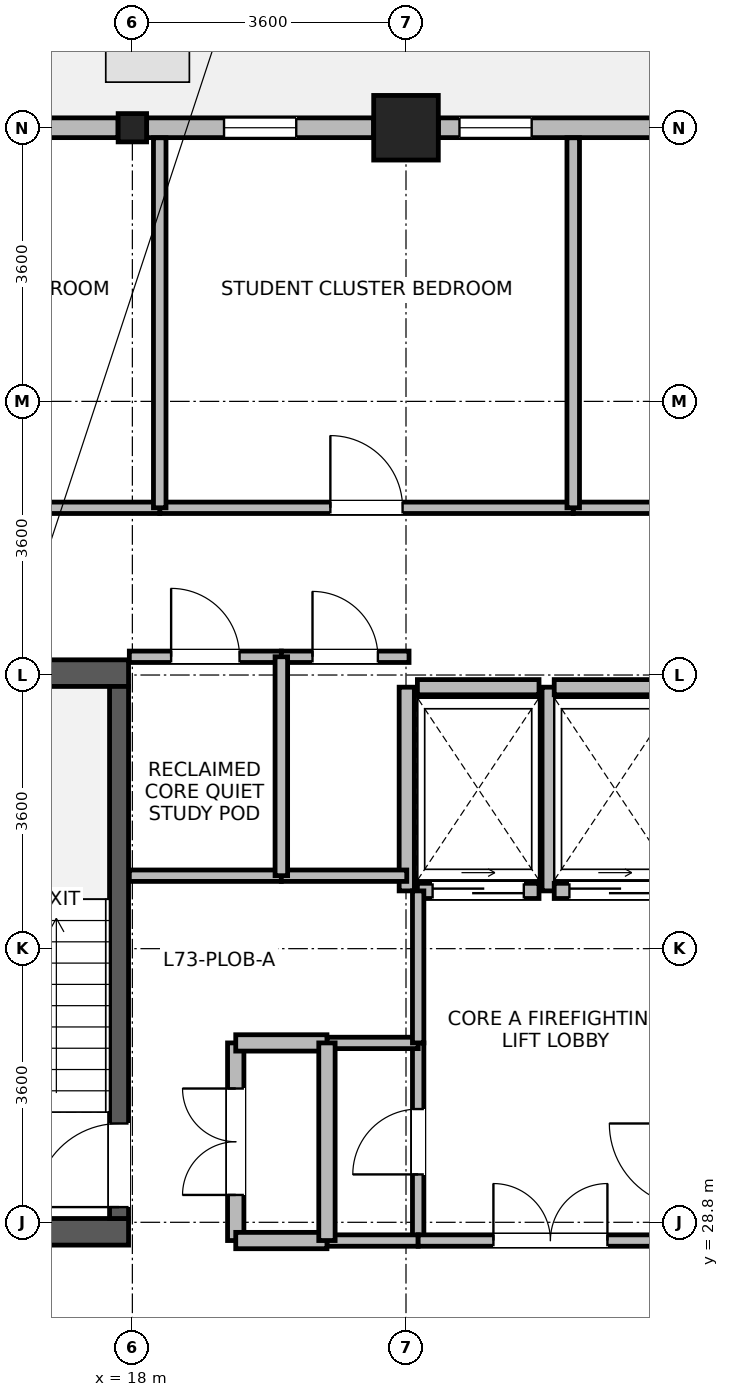
"""IFC4 building model, lengths in metres.
Left out: names, types, materials, properties, quantities, classifications, styles, units other than length and angle.
Written with IfcOpenShell. Run it as: python <this file> out.ifc"""

import sys

from ifc_helpers import new_model, si_unit, direction, frame, frame_2d, origin, origin_2d, place, context, subcontext, project, spatial, rectangle, i_section, extrude, source, transform, mapped, element, fill, save


model = new_model("IFC4")
c1 = context("Model", 3, precision=1e-05, world=origin(), true_north=direction((0.0, 1.0)))
c2 = subcontext(c1, "Body", "Model", "MODEL_VIEW")
j1 = project(units=[si_unit("LENGTHUNIT", "METRE"), si_unit("PLANEANGLEUNIT", "RADIAN")], contexts=[c1])
p1 = place(None, origin())
s1 = spatial("IfcSite", under=j1, at=p1, CompositionType="ELEMENT")
p2 = place(p1, origin())
s2 = spatial("IfcBuilding", under=s1, at=p2, CompositionType="ELEMENT")
p3 = place(p2, frame((0.0, 0.0, 283.2)))
s3 = spatial("IfcBuildingStorey", under=s2, at=p3, CompositionType="ELEMENT", Elevation=283.2)
for number, where, z_axis, x_axis in (
    (1, (14.75, 28.675, 0.0), (0.0, 0.0, 1.0), (1.0, 0.0, 0.0)),
    (2, (14.75, 36.025, 0.0), (0.0, 0.0, 1.0), (1.0, 0.0, 0.0)),
):
    element("IfcWall", number, at=place(p3, frame(where, z_axis=z_axis, x_axis=x_axis)), inside=s3, PredefinedType="SHEAR", context=c2, shape_type="SweptSolid", body=[
        extrude(rectangle(XDim=3.2, YDim=0.35, at=frame_2d((1.6, 0.0))), origin(), (0.0, 0.0, 1.0), 3.475),
    ])
p4 = place(p3, frame((17.825, 28.85, 0.0), z_axis=(0.0, 0.0, 1.0), x_axis=(0.0, 1.0, 0.0)))
e3 = element("IfcWall", 3, at=p4, inside=s3, PredefinedType="SHEAR", context=c2, shape_type="SweptSolid", body=[
    extrude(rectangle(XDim=7.0, YDim=0.25, at=frame_2d((3.5, 0.0))), origin(), (0.0, 0.0, 1.0), 3.475),
])
p5 = place(p4, frame((0.15, 0.0, 0.0)))
e4 = element("IfcOpeningElement", 4, at=p5, cuts=e3, PredefinedType="OPENING", context=c2, shape_type="SweptSolid", body=[
    extrude(rectangle(XDim=1.1, YDim=2.08, at=frame_2d((0.55, 1.04))), frame((0.0, 0.135, 0.0), z_axis=(0.0, -1.0, 0.0), x_axis=(1.0, 0.0, 0.0)), (0.0, 0.0, 1.0), 0.27),
])
m1 = source(origin(), c2, "Body", "SweptSolid", [
    extrude(rectangle(XDim=0.85, YDim=0.85, at=origin_2d()), origin(), (0.0, 0.0, 1.0), 3.7),
])
p6 = place(p3, frame((21.6, 43.2, 0.0), z_axis=(0.0, 0.0, 1.0), x_axis=(1.0, 0.0, 0.0)))
e5 = element("IfcColumn", 5, at=p6, inside=s3, PredefinedType="COLUMN", context=c2, shape_type="MappedRepresentation", body=[
    mapped(m1, transform((0.0, 0.0, 0.0), x_axis=(1.0, 0.0, 0.0), y_axis=(0.0, 1.0, 0.0), z_axis=(0.0, 0.0, 1.0), scale=1.0)),
])
m2 = source(origin(), c2, "Body", "SweptSolid", [
    extrude(i_section(OverallWidth=0.374, OverallDepth=0.372, WebThickness=0.015, FlangeThickness=0.026, FilletRadius=0.015, at=origin_2d()), origin(), (0.0, 0.0, 1.0), 3.7),
])
p7 = place(p3, frame((18.0, 43.2, 0.0), z_axis=(0.0, 0.0, 1.0), x_axis=(1.0, 0.0, 0.0)))
e6 = element("IfcColumn", 6, at=p7, inside=s3, PredefinedType="COLUMN", context=c2, shape_type="MappedRepresentation", body=[
    mapped(m2, transform((0.0, 0.0, 0.0), x_axis=(1.0, 0.0, 0.0), y_axis=(0.0, 1.0, 0.0), z_axis=(0.0, 0.0, 1.0), scale=1.0)),
])
p8 = place(p3, frame((22.026, 43.2, 0.0), z_axis=(0.0, 0.0, 1.0), x_axis=(1.0, 0.0, 0.0)))
e7 = element("IfcWall", 7, at=p8, inside=s3, PredefinedType="STANDARD", context=c2, shape_type="SweptSolid", body=[
    extrude(rectangle(XDim=2.986, YDim=0.26, at=frame_2d((1.493, 0.0))), origin(), (0.0, 0.0, 1.0), 3.055),
])
p9 = place(p8, frame((0.278, 0.0, 0.85)))
e8 = element("IfcOpeningElement", 8, at=p9, cuts=e7, PredefinedType="OPENING", context=c2, shape_type="SweptSolid", body=[
    extrude(rectangle(XDim=0.95, YDim=1.75, at=frame_2d((0.475, 0.875))), frame((0.0, 0.14, 0.0), z_axis=(0.0, -1.0, 0.0), x_axis=(1.0, 0.0, 0.0)), (0.0, 0.0, 1.0), 0.28),
])
p10 = place(p3, frame((18.188, 43.2, 0.0), z_axis=(0.0, 0.0, 1.0), x_axis=(1.0, 0.0, 0.0)))
e9 = element("IfcWall", 9, at=p10, inside=s3, PredefinedType="STANDARD", context=c2, shape_type="SweptSolid", body=[
    extrude(rectangle(XDim=2.986, YDim=0.26, at=frame_2d((1.493, 0.0))), origin(), (0.0, 0.0, 1.0), 3.055),
])
p11 = place(p10, frame((1.018, 0.0, 0.85)))
e10 = element("IfcOpeningElement", 10, at=p11, cuts=e9, PredefinedType="OPENING", context=c2, shape_type="SweptSolid", body=[
    extrude(rectangle(XDim=0.95, YDim=1.75, at=frame_2d((0.475, 0.875))), frame((0.0, 0.14, 0.0), z_axis=(0.0, -1.0, 0.0), x_axis=(1.0, 0.0, 0.0)), (0.0, 0.0, 1.0), 0.28),
])
p12 = place(p3, frame((14.826, 43.2, 0.0), z_axis=(0.0, 0.0, 1.0), x_axis=(1.0, 0.0, 0.0)))
e11 = element("IfcWall", 11, at=p12, inside=s3, PredefinedType="STANDARD", context=c2, shape_type="SweptSolid", body=[
    extrude(rectangle(XDim=2.986, YDim=0.26, at=frame_2d((1.493, 0.0))), origin(), (0.0, 0.0, 1.0), 3.055),
])
p13 = place(p12, frame((1.018, 0.0, 0.85)))
e12 = element("IfcOpeningElement", 12, at=p13, cuts=e11, PredefinedType="OPENING", context=c2, shape_type="SweptSolid", body=[
    extrude(rectangle(XDim=0.95, YDim=1.75, at=frame_2d((0.475, 0.875))), frame((0.0, 0.14, 0.0), z_axis=(0.0, -1.0, 0.0), x_axis=(1.0, 0.0, 0.0)), (0.0, 0.0, 1.0), 0.28),
])
p14 = place(p3, frame((21.75, 33.16, 0.0), z_axis=(0.0, 0.0, 1.0), x_axis=(1.0, 0.0, 0.0)))
e13 = element("IfcWall", 13, at=p14, inside=s3, PredefinedType="PARTITIONING", context=c2, shape_type="SweptSolid", body=[
    extrude(rectangle(XDim=1.6, YDim=0.2, at=frame_2d((0.8, 0.0))), origin(), (0.0, 0.0, 1.0), 3.455),
])
p15 = place(p14, frame((0.2, 0.0, 0.0)))
e14 = element("IfcOpeningElement", 14, at=p15, cuts=e13, PredefinedType="OPENING", context=c2, shape_type="SweptSolid", body=[
    extrude(rectangle(XDim=1.2, YDim=2.12, at=frame_2d((0.6, 1.06))), frame((0.0, 0.11, 0.0), z_axis=(0.0, -1.0, 0.0), x_axis=(1.0, 0.0, 0.0)), (0.0, 0.0, 1.0), 0.22),
])
p16 = place(p3, frame((21.75, 35.84, 0.0), z_axis=(0.0, 0.0, 1.0), x_axis=(1.0, 0.0, 0.0)))
e15 = element("IfcWall", 15, at=p16, inside=s3, PredefinedType="PARTITIONING", context=c2, shape_type="SweptSolid", body=[
    extrude(rectangle(XDim=1.6, YDim=0.2, at=frame_2d((0.8, 0.0))), origin(), (0.0, 0.0, 1.0), 2.555),
])
for number, where, z_axis, x_axis in (
    (16, (21.61, 33.16, 0.0), (0.0, 0.0, 1.0), (0.0, 1.0, 0.0)),
    (17, (23.49, 33.16, 0.0), (0.0, 0.0, 1.0), (0.0, 1.0, 0.0)),
):
    element("IfcWall", number, at=place(p3, frame(where, z_axis=z_axis, x_axis=x_axis)), inside=s3, PredefinedType="PARTITIONING", context=c2, shape_type="SweptSolid", body=[
        extrude(rectangle(XDim=2.68, YDim=0.2, at=frame_2d((1.34, 0.0))), origin(), (0.0, 0.0, 1.0), 3.455),
    ])
p17 = place(p3, frame((23.55, 33.16, 0.0), z_axis=(0.0, 0.0, 1.0), x_axis=(1.0, 0.0, 0.0)))
e18 = element("IfcWall", 18, at=p17, inside=s3, PredefinedType="PARTITIONING", context=c2, shape_type="SweptSolid", body=[
    extrude(rectangle(XDim=1.6, YDim=0.2, at=frame_2d((0.8, 0.0))), origin(), (0.0, 0.0, 1.0), 3.455),
])
p18 = place(p17, frame((0.2, 0.0, 0.0)))
e19 = element("IfcOpeningElement", 19, at=p18, cuts=e18, PredefinedType="OPENING", context=c2, shape_type="SweptSolid", body=[
    extrude(rectangle(XDim=1.2, YDim=2.12, at=frame_2d((0.6, 1.06))), frame((0.0, 0.11, 0.0), z_axis=(0.0, -1.0, 0.0), x_axis=(1.0, 0.0, 0.0)), (0.0, 0.0, 1.0), 0.22),
])
p19 = place(p3, frame((23.55, 35.84, 0.0), z_axis=(0.0, 0.0, 1.0), x_axis=(1.0, 0.0, 0.0)))
e20 = element("IfcWall", 20, at=p19, inside=s3, PredefinedType="PARTITIONING", context=c2, shape_type="SweptSolid", body=[
    extrude(rectangle(XDim=1.6, YDim=0.2, at=frame_2d((0.8, 0.0))), origin(), (0.0, 0.0, 1.0), 2.555),
])
p20 = place(p3, frame((23.8, 38.2, 0.0), z_axis=(0.0, 0.0, 1.0), x_axis=(1.0, 0.0, 0.0)))
e21 = element("IfcWall", 21, at=p20, inside=s3, PredefinedType="PARTITIONING", context=c2, shape_type="SweptSolid", body=[
    extrude(rectangle(XDim=7.26, YDim=0.15, at=frame_2d((3.63, 0.0))), origin(), (0.0, 0.0, 1.0), 3.455),
])
p21 = place(p20, frame((2.98, 0.0, 0.0)))
e22 = element("IfcOpeningElement", 22, at=p21, cuts=e21, PredefinedType="OPENING", context=c2, shape_type="SweptSolid", body=[
    extrude(rectangle(XDim=1.3, YDim=2.12, at=frame_2d((0.65, 1.06))), frame((0.0, 0.085, 0.0), z_axis=(0.0, -1.0, 0.0), x_axis=(1.0, 0.0, 0.0)), (0.0, 0.0, 1.0), 0.17),
])
p22 = place(p3, frame((18.36, 38.2, 0.0), z_axis=(0.0, 0.0, 1.0), x_axis=(1.0, 0.0, 0.0)))
e23 = element("IfcWall", 23, at=p22, inside=s3, PredefinedType="PARTITIONING", context=c2, shape_type="SweptSolid", body=[
    extrude(rectangle(XDim=5.44, YDim=0.15, at=frame_2d((2.72, 0.0))), origin(), (0.0, 0.0, 1.0), 3.455),
])
p23 = place(p22, frame((2.245, 0.0, 0.0)))
e24 = element("IfcOpeningElement", 24, at=p23, cuts=e23, PredefinedType="OPENING", context=c2, shape_type="SweptSolid", body=[
    extrude(rectangle(XDim=0.95, YDim=2.1, at=frame_2d((0.475, 1.05))), frame((0.0, 0.085, 0.0), z_axis=(0.0, -1.0, 0.0), x_axis=(1.0, 0.0, 0.0)), (0.0, 0.0, 1.0), 0.17),
])
p24 = place(p3, frame((13.2, 38.2, 0.0), z_axis=(0.0, 0.0, 1.0), x_axis=(1.0, 0.0, 0.0)))
e25 = element("IfcWall", 25, at=p24, inside=s3, PredefinedType="PARTITIONING", context=c2, shape_type="SweptSolid", body=[
    extrude(rectangle(XDim=5.16, YDim=0.15, at=frame_2d((2.58, 0.0))), origin(), (0.0, 0.0, 1.0), 3.455),
])
p25 = place(p24, frame((2.105, 0.0, 0.0)))
e26 = element("IfcOpeningElement", 26, at=p25, cuts=e25, PredefinedType="OPENING", context=c2, shape_type="SweptSolid", body=[
    extrude(rectangle(XDim=0.95, YDim=2.1, at=frame_2d((0.475, 1.05))), frame((0.0, 0.085, 0.0), z_axis=(0.0, -1.0, 0.0), x_axis=(1.0, 0.0, 0.0)), (0.0, 0.0, 1.0), 0.17),
])
p26 = place(p3, frame((19.36, 28.56, 0.0), z_axis=(0.0, 0.0, 1.0), x_axis=(0.0, 1.0, 0.0)))
e27 = element("IfcWall", 27, at=p26, inside=s3, PredefinedType="PARTITIONING", context=c2, shape_type="SweptSolid", body=[
    extrude(rectangle(XDim=2.6, YDim=0.215, at=frame_2d((1.3, 0.0))), origin(), (0.0, 0.0, 1.0), 3.455),
])
p27 = place(p26, frame((0.6, 0.0, 0.0)))
e28 = element("IfcOpeningElement", 28, at=p27, cuts=e27, PredefinedType="OPENING", context=c2, shape_type="SweptSolid", body=[
    extrude(rectangle(XDim=1.4, YDim=2.15, at=frame_2d((0.7, 1.075))), frame((0.0, 0.118, 0.0), z_axis=(0.0, -1.0, 0.0), x_axis=(1.0, 0.0, 0.0)), (0.0, 0.0, 1.0), 0.235),
])
p28 = place(p3, frame((21.76, 28.56, 0.0), z_axis=(0.0, 0.0, 1.0), x_axis=(0.0, 1.0, 0.0)))
e29 = element("IfcWall", 29, at=p28, inside=s3, PredefinedType="PARTITIONING", context=c2, shape_type="SweptSolid", body=[
    extrude(rectangle(XDim=2.6, YDim=0.15, at=frame_2d((1.3, 0.0))), origin(), (0.0, 0.0, 1.0), 3.455),
])
p29 = place(p28, frame((0.87, 0.0, 0.0)))
e30 = element("IfcOpeningElement", 30, at=p29, cuts=e29, PredefinedType="OPENING", context=c2, shape_type="SweptSolid", body=[
    extrude(rectangle(XDim=0.86, YDim=2.02, at=frame_2d((0.43, 1.01))), frame((0.0, 0.085, 0.0), z_axis=(0.0, -1.0, 0.0), x_axis=(1.0, 0.0, 0.0)), (0.0, 0.0, 1.0), 0.17),
])
p30 = place(p3, frame((17.96, 33.36, 0.0), z_axis=(0.0, 0.0, 1.0), x_axis=(1.0, 0.0, 0.0)))
e31 = element("IfcWall", 31, at=p30, inside=s3, PredefinedType="PARTITIONING", context=c2, shape_type="SweptSolid", body=[
    extrude(rectangle(XDim=2.0, YDim=0.15, at=frame_2d((1.0, 0.0))), origin(), (0.0, 0.0, 1.0), 3.455),
])
p31 = place(p3, frame((17.96, 36.24, 0.0), z_axis=(0.0, 0.0, 1.0), x_axis=(1.0, 0.0, 0.0)))
e32 = element("IfcWall", 32, at=p31, inside=s3, PredefinedType="PARTITIONING", context=c2, shape_type="SweptSolid", body=[
    extrude(rectangle(XDim=2.0, YDim=0.15, at=frame_2d((1.0, 0.0))), origin(), (0.0, 0.0, 1.0), 2.555),
])
p32 = place(p31, frame((0.55, 0.0, 0.0)))
e33 = element("IfcOpeningElement", 33, at=p32, cuts=e32, PredefinedType="OPENING", context=c2, shape_type="SweptSolid", body=[
    extrude(rectangle(XDim=0.9, YDim=2.08, at=frame_2d((0.45, 1.04))), frame((0.0, 0.085, 0.0), z_axis=(0.0, -1.0, 0.0), x_axis=(1.0, 0.0, 0.0)), (0.0, 0.0, 1.0), 0.17),
])
p33 = place(p3, frame((19.96, 33.36, 0.0), z_axis=(0.0, 0.0, 1.0), x_axis=(1.0, 0.0, 0.0)))
e34 = element("IfcWall", 34, at=p33, inside=s3, PredefinedType="PARTITIONING", context=c2, shape_type="SweptSolid", body=[
    extrude(rectangle(XDim=1.65, YDim=0.15, at=frame_2d((0.825, 0.0))), origin(), (0.0, 0.0, 1.0), 3.455),
])
p34 = place(p3, frame((19.96, 36.24, 0.0), z_axis=(0.0, 0.0, 1.0), x_axis=(1.0, 0.0, 0.0)))
e35 = element("IfcWall", 35, at=p34, inside=s3, PredefinedType="PARTITIONING", context=c2, shape_type="SweptSolid", body=[
    extrude(rectangle(XDim=1.68, YDim=0.15, at=frame_2d((0.84, 0.0))), origin(), (0.0, 0.0, 1.0), 2.555),
])
p35 = place(p34, frame((0.41, 0.0, 0.0)))
e36 = element("IfcOpeningElement", 36, at=p35, cuts=e35, PredefinedType="OPENING", context=c2, shape_type="SweptSolid", body=[
    extrude(rectangle(XDim=0.86, YDim=2.02, at=frame_2d((0.43, 1.01))), frame((0.0, 0.085, 0.0), z_axis=(0.0, -1.0, 0.0), x_axis=(1.0, 0.0, 0.0)), (0.0, 0.0, 1.0), 0.17),
])
p36 = place(p3, frame((20.56, 28.56, 0.0), z_axis=(0.0, 0.0, 1.0), x_axis=(1.0, 0.0, 0.0)))
e37 = element("IfcWall", 37, at=p36, inside=s3, PredefinedType="PARTITIONING", context=c2, shape_type="SweptSolid", body=[
    extrude(rectangle(XDim=1.2, YDim=0.15, at=frame_2d((0.6, 0.0))), origin(), (0.0, 0.0, 1.0), 2.555),
])
p37 = place(p3, frame((20.56, 31.16, 0.0), z_axis=(0.0, 0.0, 1.0), x_axis=(1.0, 0.0, 0.0)))
e38 = element("IfcWall", 38, at=p37, inside=s3, PredefinedType="PARTITIONING", context=c2, shape_type="SweptSolid", body=[
    extrude(rectangle(XDim=1.2, YDim=0.15, at=frame_2d((0.6, 0.0))), origin(), (0.0, 0.0, 1.0), 3.455),
])
p38 = place(p3, frame((19.36, 28.56, 0.0), z_axis=(0.0, 0.0, 1.0), x_axis=(1.0, 0.0, 0.0)))
e39 = element("IfcWall", 39, at=p38, inside=s3, PredefinedType="PARTITIONING", context=c2, shape_type="SweptSolid", body=[
    extrude(rectangle(XDim=1.2, YDim=0.215, at=frame_2d((0.6, 0.0))), origin(), (0.0, 0.0, 1.0), 2.555),
])
p39 = place(p3, frame((19.36, 31.16, 0.0), z_axis=(0.0, 0.0, 1.0), x_axis=(1.0, 0.0, 0.0)))
e40 = element("IfcWall", 40, at=p39, inside=s3, PredefinedType="PARTITIONING", context=c2, shape_type="SweptSolid", body=[
    extrude(rectangle(XDim=1.2, YDim=0.215, at=frame_2d((0.6, 0.0))), origin(), (0.0, 0.0, 1.0), 3.455),
])
for number, where, z_axis, x_axis in (
    (41, (18.36, 38.2, 0.0), (0.0, 0.0, 1.0), (0.0, 1.0, 0.0)),
    (42, (23.8, 38.2, 0.0), (0.0, 0.0, 1.0), (0.0, 1.0, 0.0)),
):
    element("IfcWall", number, at=place(p3, frame(where, z_axis=z_axis, x_axis=x_axis)), inside=s3, PredefinedType="PARTITIONING", context=c2, shape_type="SweptSolid", body=[
        extrude(rectangle(XDim=4.868, YDim=0.165, at=frame_2d((2.434, 0.0))), origin(), (0.0, 0.0, 1.0), 3.455),
    ])
p40 = place(p3, frame((21.76, 28.56, 0.0), z_axis=(0.0, 0.0, 1.0), x_axis=(1.0, 0.0, 0.0)))
e43 = element("IfcWall", 43, at=p40, inside=s3, PredefinedType="PARTITIONING", context=c2, shape_type="SweptSolid", body=[
    extrude(rectangle(XDim=3.48, YDim=0.15, at=frame_2d((1.74, 0.0))), origin(), (0.0, 0.0, 1.0), 2.555),
])
p41 = place(p40, frame((0.99, 0.0, 0.0)))
e44 = element("IfcOpeningElement", 44, at=p41, cuts=e43, PredefinedType="OPENING", context=c2, shape_type="SweptSolid", body=[
    extrude(rectangle(XDim=1.5, YDim=2.1, at=frame_2d((0.75, 1.05))), frame((0.0, 0.085, 0.0), z_axis=(0.0, -1.0, 0.0), x_axis=(1.0, 0.0, 0.0)), (0.0, 0.0, 1.0), 0.17),
])
p42 = place(p3, frame((19.96, 33.36, 0.0), z_axis=(0.0, 0.0, 1.0), x_axis=(0.0, 1.0, 0.0)))
e45 = element("IfcWall", 45, at=p42, inside=s3, PredefinedType="PARTITIONING", context=c2, shape_type="SweptSolid", body=[
    extrude(rectangle(XDim=2.88, YDim=0.165, at=frame_2d((1.44, 0.0))), origin(), (0.0, 0.0, 1.0), 3.455),
])
p43 = place(p3, frame((20.56, 28.56, 0.0), z_axis=(0.0, 0.0, 1.0), x_axis=(0.0, 1.0, 0.0)))
e46 = element("IfcWall", 46, at=p43, inside=s3, PredefinedType="PARTITIONING", context=c2, shape_type="SweptSolid", body=[
    extrude(rectangle(XDim=2.6, YDim=0.215, at=frame_2d((1.3, 0.0))), origin(), (0.0, 0.0, 1.0), 3.455),
])
p44 = place(p3, frame((21.76, 31.16, 0.0), z_axis=(0.0, 0.0, 1.0), x_axis=(0.0, 1.0, 0.0)))
e47 = element("IfcWall", 47, at=p44, inside=s3, PredefinedType="PARTITIONING", context=c2, shape_type="SweptSolid", body=[
    extrude(rectangle(XDim=2.0, YDim=0.15, at=frame_2d((1.0, 0.0))), origin(), (0.0, 0.0, 1.0), 3.455),
])
p45 = place(p9, origin())
e48 = element("IfcWindow", 48, at=p45, inside=s3, PartitioningType="SINGLE_PANEL", PredefinedType="WINDOW", context=c2, shape_type="SweptSolid", body=[
    extrude(rectangle(XDim=0.95, YDim=1.75, at=frame_2d((0.475, 0.875))), frame((0.0, 0.03, 0.0), z_axis=(0.0, -1.0, 0.0), x_axis=(1.0, 0.0, 0.0)), (0.0, 0.0, 1.0), 0.06),
])
fill(e8, e48)
p46 = place(p11, origin())
e49 = element("IfcWindow", 49, at=p46, inside=s3, PartitioningType="SINGLE_PANEL", PredefinedType="WINDOW", context=c2, shape_type="SweptSolid", body=[
    extrude(rectangle(XDim=0.95, YDim=1.75, at=frame_2d((0.475, 0.875))), frame((0.0, 0.03, 0.0), z_axis=(0.0, -1.0, 0.0), x_axis=(1.0, 0.0, 0.0)), (0.0, 0.0, 1.0), 0.06),
])
fill(e10, e49)
p47 = place(p5, origin())
e50 = element("IfcDoor", 50, at=p47, inside=s3, OperationType="SINGLE_SWING_LEFT", PredefinedType="DOOR", context=c2, shape_type="SweptSolid", body=[
    extrude(rectangle(XDim=1.1, YDim=2.08, at=frame_2d((0.55, 1.04))), frame((0.0, 0.025, 0.0), z_axis=(0.0, -1.0, 0.0), x_axis=(1.0, 0.0, 0.0)), (0.0, 0.0, 1.0), 0.05),
])
fill(e4, e50)
p48 = place(p15, origin())
e51 = element("IfcDoor", 51, at=p48, inside=s3, OperationType="SLIDING_TO_RIGHT", PredefinedType="DOOR", context=c2, shape_type="SweptSolid", body=[
    extrude(rectangle(XDim=1.2, YDim=2.12, at=frame_2d((0.6, 1.06))), frame((0.0, 0.025, 0.0), z_axis=(0.0, -1.0, 0.0), x_axis=(1.0, 0.0, 0.0)), (0.0, 0.0, 1.0), 0.05),
])
fill(e14, e51)
p49 = place(p18, origin())
e52 = element("IfcDoor", 52, at=p49, inside=s3, OperationType="SLIDING_TO_RIGHT", PredefinedType="DOOR", context=c2, shape_type="SweptSolid", body=[
    extrude(rectangle(XDim=1.2, YDim=2.12, at=frame_2d((0.6, 1.06))), frame((0.0, 0.025, 0.0), z_axis=(0.0, -1.0, 0.0), x_axis=(1.0, 0.0, 0.0)), (0.0, 0.0, 1.0), 0.05),
])
fill(e19, e52)
p50 = place(p23, origin())
e53 = element("IfcDoor", 53, at=p50, inside=s3, OperationType="SINGLE_SWING_LEFT", PredefinedType="DOOR", context=c2, shape_type="SweptSolid", body=[
    extrude(rectangle(XDim=0.95, YDim=2.1, at=frame_2d((0.475, 1.05))), frame((0.0, 0.025, 0.0), z_axis=(0.0, -1.0, 0.0), x_axis=(1.0, 0.0, 0.0)), (0.0, 0.0, 1.0), 0.05),
])
fill(e24, e53)
p51 = place(p27, origin())
e54 = element("IfcDoor", 54, at=p51, inside=s3, OperationType="DOUBLE_DOOR_SINGLE_SWING", PredefinedType="DOOR", context=c2, shape_type="SweptSolid", body=[
    extrude(rectangle(XDim=1.4, YDim=2.15, at=frame_2d((0.7, 1.075))), frame((0.0, 0.025, 0.0), z_axis=(0.0, -1.0, 0.0), x_axis=(1.0, 0.0, 0.0)), (0.0, 0.0, 1.0), 0.05),
])
fill(e28, e54)
p52 = place(p29, origin())
e55 = element("IfcDoor", 55, at=p52, inside=s3, OperationType="SINGLE_SWING_LEFT", PredefinedType="DOOR", context=c2, shape_type="SweptSolid", body=[
    extrude(rectangle(XDim=0.86, YDim=2.02, at=frame_2d((0.43, 1.01))), frame((0.0, 0.025, 0.0), z_axis=(0.0, -1.0, 0.0), x_axis=(1.0, 0.0, 0.0)), (0.0, 0.0, 1.0), 0.05),
])
fill(e30, e55)
p53 = place(p32, origin())
e56 = element("IfcDoor", 56, at=p53, inside=s3, OperationType="SINGLE_SWING_LEFT", PredefinedType="DOOR", context=c2, shape_type="SweptSolid", body=[
    extrude(rectangle(XDim=0.9, YDim=2.08, at=frame_2d((0.45, 1.04))), frame((0.0, 0.025, 0.0), z_axis=(0.0, -1.0, 0.0), x_axis=(1.0, 0.0, 0.0)), (0.0, 0.0, 1.0), 0.05),
])
fill(e33, e56)
p54 = place(p35, origin())
e57 = element("IfcDoor", 57, at=p54, inside=s3, OperationType="SINGLE_SWING_LEFT", PredefinedType="DOOR", context=c2, shape_type="SweptSolid", body=[
    extrude(rectangle(XDim=0.86, YDim=2.02, at=frame_2d((0.43, 1.01))), frame((0.0, 0.025, 0.0), z_axis=(0.0, -1.0, 0.0), x_axis=(1.0, 0.0, 0.0)), (0.0, 0.0, 1.0), 0.05),
])
fill(e36, e57)
p55 = place(p41, origin())
e58 = element("IfcDoor", 58, at=p55, inside=s3, OperationType="DOUBLE_DOOR_SINGLE_SWING", PredefinedType="DOOR", context=c2, shape_type="SweptSolid", body=[
    extrude(rectangle(XDim=1.5, YDim=2.1, at=frame_2d((0.75, 1.05))), frame((0.0, 0.025, 0.0), z_axis=(0.0, -1.0, 0.0), x_axis=(1.0, 0.0, 0.0)), (0.0, 0.0, 1.0), 0.05),
])
fill(e44, e58)
save(model, sys.argv[1])
